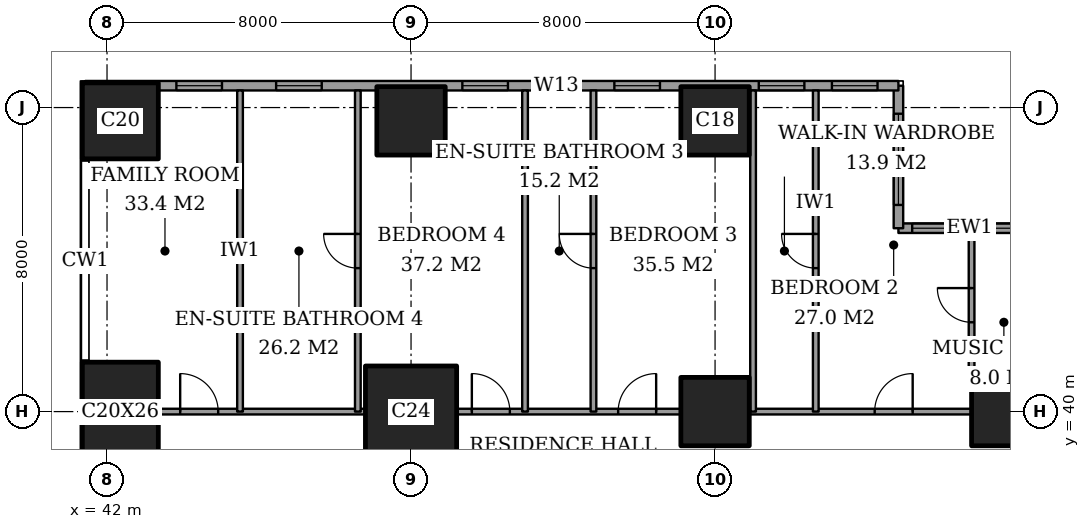
"""IFC4 building model, lengths in metres.
Left out: names, types, materials, properties, quantities, classifications, styles, units other than length and angle.
Written with IfcOpenShell. Run it as: python <this file> out.ifc"""

import sys

from ifc_helpers import new_model, si_unit, direction, frame, frame_2d, origin, origin_2d, place, context, subcontext, project, spatial, rectangle, extrude, element, fill, save


model = new_model("IFC4")
c1 = context("Model", 3, precision=1e-05, world=origin(), true_north=direction((0.0, 1.0)))
c2 = subcontext(c1, "Body", "Model", "MODEL_VIEW")
j1 = project(units=[si_unit("LENGTHUNIT", "METRE"), si_unit("PLANEANGLEUNIT", "RADIAN")], contexts=[c1])
p1 = place(None, origin())
s1 = spatial("IfcSite", under=j1, at=p1, CompositionType="ELEMENT")
p2 = place(p1, origin())
s2 = spatial("IfcBuilding", under=s1, at=p2, CompositionType="ELEMENT")
p3 = place(p2, frame((0.0, 0.0, 211.0)))
s3 = spatial("IfcBuildingStorey", under=s2, at=p3, CompositionType="ELEMENT", Elevation=211.0)
p4 = place(p3, frame((42.35, 40.0, 0.0), z_axis=(0.0, 0.0, 1.0), x_axis=(1.0, 0.0, 0.0)))
e1 = element("IfcColumn", 1, at=p4, inside=s3, PredefinedType="COLUMN", context=c2, shape_type="SweptSolid", body=[
    extrude(rectangle(XDim=2.0, YDim=2.6, at=origin_2d()), origin(), (0.0, 0.0, 1.0), 3.6),
])
p5 = place(p3, frame((42.35, 47.65, 0.0), z_axis=(0.0, 0.0, 1.0), x_axis=(1.0, 0.0, 0.0)))
e2 = element("IfcColumn", 2, at=p5, inside=s3, PredefinedType="COLUMN", context=c2, shape_type="SweptSolid", body=[
    extrude(rectangle(XDim=2.0, YDim=2.0, at=origin_2d()), origin(), (0.0, 0.0, 1.0), 3.6),
])
p6 = place(p3, frame((50.0, 40.0, 0.0), z_axis=(0.0, 0.0, 1.0), x_axis=(1.0, 0.0, 0.0)))
e3 = element("IfcColumn", 3, at=p6, inside=s3, PredefinedType="COLUMN", context=c2, shape_type="SweptSolid", body=[
    extrude(rectangle(XDim=2.4, YDim=2.4, at=origin_2d()), origin(), (0.0, 0.0, 1.0), 3.6),
])
for number, where, z_axis, x_axis in (
    (4, (50.0, 47.65, 0.0), (0.0, 0.0, 1.0), (1.0, 0.0, 0.0)),
    (5, (58.0, 40.0, 0.0), (0.0, 0.0, 1.0), (1.0, 0.0, 0.0)),
    (6, (58.0, 47.65, 0.0), (0.0, 0.0, 1.0), (1.0, 0.0, 0.0)),
    (7, (65.65, 40.0, 0.0), (0.0, 0.0, 1.0), (1.0, 0.0, 0.0)),
):
    element("IfcColumn", number, at=place(p3, frame(where, z_axis=z_axis, x_axis=x_axis)), inside=s3, PredefinedType="COLUMN", context=c2, shape_type="SweptSolid", body=[
        extrude(rectangle(XDim=1.8, YDim=1.8, at=origin_2d()), origin(), (0.0, 0.0, 1.0), 3.6),
    ])
p7 = place(p3, frame((66.575, 44.825, 0.0), z_axis=(0.0, 0.0, 1.0), x_axis=(-1.0, 0.0, 0.0)))
e8 = element("IfcWall", 8, at=p7, inside=s3, PredefinedType="SOLIDWALL", context=c2, shape_type="SweptSolid", body=[
    extrude(rectangle(XDim=3.75, YDim=0.25, at=frame_2d((1.875, 0.0))), origin(), (0.0, 0.0, 1.0), 3.6),
])
p8 = place(p7, frame((0.45, 0.0, 0.2)))
e9 = element("IfcOpeningElement", 9, at=p8, cuts=e8, PredefinedType="OPENING", context=c2, shape_type="SweptSolid", body=[
    extrude(rectangle(XDim=1.2, YDim=2.4, at=frame_2d((0.6, 1.2))), frame((0.0, 0.135, 0.0), z_axis=(0.0, -1.0, 0.0), x_axis=(1.0, 0.0, 0.0)), (0.0, 0.0, 1.0), 0.27),
])
p9 = place(p7, frame((2.188, 0.0, 0.2)))
e10 = element("IfcOpeningElement", 10, at=p9, cuts=e8, PredefinedType="OPENING", context=c2, shape_type="SweptSolid", body=[
    extrude(rectangle(XDim=1.2, YDim=2.4, at=frame_2d((0.6, 1.2))), frame((0.0, 0.135, 0.0), z_axis=(0.0, -1.0, 0.0), x_axis=(1.0, 0.0, 0.0)), (0.0, 0.0, 1.0), 0.27),
])
p10 = place(p3, frame((62.825, 44.825, 0.0), z_axis=(0.0, 0.0, 1.0), x_axis=(0.0, 1.0, 0.0)))
e11 = element("IfcWall", 11, at=p10, inside=s3, PredefinedType="SOLIDWALL", context=c2, shape_type="SweptSolid", body=[
    extrude(rectangle(XDim=3.75, YDim=0.25, at=frame_2d((1.875, 0.0))), origin(), (0.0, 0.0, 1.0), 3.6),
])
p11 = place(p10, frame((0.613, 0.0, 0.2)))
e12 = element("IfcOpeningElement", 12, at=p11, cuts=e11, PredefinedType="OPENING", context=c2, shape_type="SweptSolid", body=[
    extrude(rectangle(XDim=2.4, YDim=2.4, at=frame_2d((1.2, 1.2))), frame((0.0, 0.135, 0.0), z_axis=(0.0, -1.0, 0.0), x_axis=(1.0, 0.0, 0.0)), (0.0, 0.0, 1.0), 0.27),
])
p12 = place(p3, frame((62.825, 48.575, 0.0), z_axis=(0.0, 0.0, 1.0), x_axis=(-1.0, 0.0, 0.0)))
e13 = element("IfcWall", 13, at=p12, inside=s3, PredefinedType="SOLIDWALL", context=c2, shape_type="SweptSolid", body=[
    extrude(rectangle(XDim=21.4, YDim=0.25, at=frame_2d((10.7, 0.0))), origin(), (0.0, 0.0, 1.0), 3.6),
])
p13 = place(p12, frame((0.55, 0.0, 0.2)))
e14 = element("IfcOpeningElement", 14, at=p13, cuts=e13, PredefinedType="OPENING", context=c2, shape_type="SweptSolid", body=[
    extrude(rectangle(XDim=1.2, YDim=2.4, at=frame_2d((0.6, 1.2))), frame((0.0, 0.135, 0.0), z_axis=(0.0, -1.0, 0.0), x_axis=(1.0, 0.0, 0.0)), (0.0, 0.0, 1.0), 0.27),
])
p14 = place(p12, frame((2.475, 0.0, 0.2)))
e15 = element("IfcOpeningElement", 15, at=p14, cuts=e13, PredefinedType="OPENING", context=c2, shape_type="SweptSolid", body=[
    extrude(rectangle(XDim=1.2, YDim=2.4, at=frame_2d((0.6, 1.2))), frame((0.0, 0.135, 0.0), z_axis=(0.0, -1.0, 0.0), x_axis=(1.0, 0.0, 0.0)), (0.0, 0.0, 1.0), 0.27),
])
p15 = place(p12, frame((6.275, 0.0, 0.2)))
e16 = element("IfcOpeningElement", 16, at=p15, cuts=e13, PredefinedType="OPENING", context=c2, shape_type="SweptSolid", body=[
    extrude(rectangle(XDim=1.2, YDim=2.4, at=frame_2d((0.6, 1.2))), frame((0.0, 0.135, 0.0), z_axis=(0.0, -1.0, 0.0), x_axis=(1.0, 0.0, 0.0)), (0.0, 0.0, 1.0), 0.27),
])
p16 = place(p12, frame((8.4, 0.0, 0.2)))
e17 = element("IfcOpeningElement", 17, at=p16, cuts=e13, PredefinedType="OPENING", context=c2, shape_type="SweptSolid", body=[
    extrude(rectangle(XDim=1.2, YDim=2.4, at=frame_2d((0.6, 1.2))), frame((0.0, 0.135, 0.0), z_axis=(0.0, -1.0, 0.0), x_axis=(1.0, 0.0, 0.0)), (0.0, 0.0, 1.0), 0.27),
])
p17 = place(p12, frame((10.275, 0.0, 0.2)))
e18 = element("IfcOpeningElement", 18, at=p17, cuts=e13, PredefinedType="OPENING", context=c2, shape_type="SweptSolid", body=[
    extrude(rectangle(XDim=1.2, YDim=2.4, at=frame_2d((0.6, 1.2))), frame((0.0, 0.135, 0.0), z_axis=(0.0, -1.0, 0.0), x_axis=(1.0, 0.0, 0.0)), (0.0, 0.0, 1.0), 0.27),
])
p18 = place(p12, frame((15.175, 0.0, 0.2)))
e19 = element("IfcOpeningElement", 19, at=p18, cuts=e13, PredefinedType="OPENING", context=c2, shape_type="SweptSolid", body=[
    extrude(rectangle(XDim=1.2, YDim=2.4, at=frame_2d((0.6, 1.2))), frame((0.0, 0.135, 0.0), z_axis=(0.0, -1.0, 0.0), x_axis=(1.0, 0.0, 0.0)), (0.0, 0.0, 1.0), 0.27),
])
p19 = place(p12, frame((17.8, 0.0, 0.2)))
e20 = element("IfcOpeningElement", 20, at=p19, cuts=e13, PredefinedType="OPENING", context=c2, shape_type="SweptSolid", body=[
    extrude(rectangle(XDim=1.2, YDim=2.4, at=frame_2d((0.6, 1.2))), frame((0.0, 0.135, 0.0), z_axis=(0.0, -1.0, 0.0), x_axis=(1.0, 0.0, 0.0)), (0.0, 0.0, 1.0), 0.27),
])
p20 = place(p3, frame((43.35, 40.0, 0.0), z_axis=(0.0, 0.0, 1.0), x_axis=(1.0, 0.0, 0.0)))
e21 = element("IfcWall", 21, at=p20, inside=s3, PredefinedType="PARTITIONING", context=c2, shape_type="SweptSolid", body=[
    extrude(rectangle(XDim=5.45, YDim=0.15, at=frame_2d((2.725, 0.0))), origin(), (0.0, 0.0, 1.0), 3.35),
])
p21 = place(p20, frame((0.575, 0.0, 0.0)))
e22 = element("IfcOpeningElement", 22, at=p21, cuts=e21, PredefinedType="OPENING", context=c2, shape_type="SweptSolid", body=[
    extrude(rectangle(XDim=1.0, YDim=2.1, at=frame_2d((0.5, 1.05))), frame((0.0, 0.085, 0.0), z_axis=(0.0, -1.0, 0.0), x_axis=(1.0, 0.0, 0.0)), (0.0, 0.0, 1.0), 0.17),
])
p22 = place(p3, frame((51.2, 40.0, 0.0), z_axis=(0.0, 0.0, 1.0), x_axis=(1.0, 0.0, 0.0)))
e23 = element("IfcWall", 23, at=p22, inside=s3, PredefinedType="PARTITIONING", context=c2, shape_type="SweptSolid", body=[
    extrude(rectangle(XDim=5.9, YDim=0.15, at=frame_2d((2.95, 0.0))), origin(), (0.0, 0.0, 1.0), 3.35),
])
p23 = place(p22, frame((4.25, 0.0, 0.0)))
e24 = element("IfcOpeningElement", 24, at=p23, cuts=e23, PredefinedType="OPENING", context=c2, shape_type="SweptSolid", body=[
    extrude(rectangle(XDim=1.0, YDim=2.1, at=frame_2d((0.5, 1.05))), frame((0.0, 0.085, 0.0), z_axis=(0.0, -1.0, 0.0), x_axis=(1.0, 0.0, 0.0)), (0.0, 0.0, 1.0), 0.17),
])
p24 = place(p22, frame((0.4, 0.0, 0.0)))
e25 = element("IfcOpeningElement", 25, at=p24, cuts=e23, PredefinedType="OPENING", context=c2, shape_type="SweptSolid", body=[
    extrude(rectangle(XDim=1.0, YDim=2.1, at=frame_2d((0.5, 1.05))), frame((0.0, 0.085, 0.0), z_axis=(0.0, -1.0, 0.0), x_axis=(1.0, 0.0, 0.0)), (0.0, 0.0, 1.0), 0.17),
])
p25 = place(p3, frame((58.9, 40.0, 0.0), z_axis=(0.0, 0.0, 1.0), x_axis=(1.0, 0.0, 0.0)))
e26 = element("IfcWall", 26, at=p25, inside=s3, PredefinedType="PARTITIONING", context=c2, shape_type="SweptSolid", body=[
    extrude(rectangle(XDim=5.85, YDim=0.15, at=frame_2d((2.925, 0.0))), origin(), (0.0, 0.0, 1.0), 3.35),
])
p26 = place(p25, frame((3.3, 0.0, 0.0)))
e27 = element("IfcOpeningElement", 27, at=p26, cuts=e26, PredefinedType="OPENING", context=c2, shape_type="SweptSolid", body=[
    extrude(rectangle(XDim=1.0, YDim=2.1, at=frame_2d((0.5, 1.05))), frame((0.0, 0.085, 0.0), z_axis=(0.0, -1.0, 0.0), x_axis=(1.0, 0.0, 0.0)), (0.0, 0.0, 1.0), 0.17),
])
p27 = place(p3, frame((45.5, 40.0, 0.0), z_axis=(0.0, 0.0, 1.0), x_axis=(0.0, 1.0, 0.0)))
e28 = element("IfcWall", 28, at=p27, inside=s3, PredefinedType="PARTITIONING", context=c2, shape_type="SweptSolid", body=[
    extrude(rectangle(XDim=8.45, YDim=0.15, at=frame_2d((4.225, 0.0))), origin(), (0.0, 0.0, 1.0), 3.35),
])
p28 = place(p3, frame((48.6, 40.0, 0.0), z_axis=(0.0, 0.0, 1.0), x_axis=(0.0, 1.0, 0.0)))
e29 = element("IfcWall", 29, at=p28, inside=s3, PredefinedType="PARTITIONING", context=c2, shape_type="SweptSolid", body=[
    extrude(rectangle(XDim=8.45, YDim=0.15, at=frame_2d((4.225, 0.0))), origin(), (0.0, 0.0, 1.0), 3.35),
])
p29 = place(p28, frame((3.775, 0.0, 0.0)))
e30 = element("IfcOpeningElement", 30, at=p29, cuts=e29, PredefinedType="OPENING", context=c2, shape_type="SweptSolid", body=[
    extrude(rectangle(XDim=0.9, YDim=2.1, at=frame_2d((0.45, 1.05))), frame((0.0, 0.085, 0.0), z_axis=(0.0, -1.0, 0.0), x_axis=(1.0, 0.0, 0.0)), (0.0, 0.0, 1.0), 0.17),
])
p30 = place(p3, frame((53.0, 40.0, 0.0), z_axis=(0.0, 0.0, 1.0), x_axis=(0.0, 1.0, 0.0)))
e31 = element("IfcWall", 31, at=p30, inside=s3, PredefinedType="PARTITIONING", context=c2, shape_type="SweptSolid", body=[
    extrude(rectangle(XDim=8.45, YDim=0.15, at=frame_2d((4.225, 0.0))), origin(), (0.0, 0.0, 1.0), 3.35),
])
p31 = place(p3, frame((54.8, 40.0, 0.0), z_axis=(0.0, 0.0, 1.0), x_axis=(0.0, 1.0, 0.0)))
e32 = element("IfcWall", 32, at=p31, inside=s3, PredefinedType="PARTITIONING", context=c2, shape_type="SweptSolid", body=[
    extrude(rectangle(XDim=8.45, YDim=0.15, at=frame_2d((4.225, 0.0))), origin(), (0.0, 0.0, 1.0), 3.35),
])
p32 = place(p31, frame((3.775, 0.0, 0.0)))
e33 = element("IfcOpeningElement", 33, at=p32, cuts=e32, PredefinedType="OPENING", context=c2, shape_type="SweptSolid", body=[
    extrude(rectangle(XDim=0.9, YDim=2.1, at=frame_2d((0.45, 1.05))), frame((0.0, 0.085, 0.0), z_axis=(0.0, -1.0, 0.0), x_axis=(1.0, 0.0, 0.0)), (0.0, 0.0, 1.0), 0.17),
])
p33 = place(p3, frame((59.0, 40.0, 0.0), z_axis=(0.0, 0.0, 1.0), x_axis=(0.0, 1.0, 0.0)))
e34 = element("IfcWall", 34, at=p33, inside=s3, PredefinedType="PARTITIONING", context=c2, shape_type="SweptSolid", body=[
    extrude(rectangle(XDim=8.45, YDim=0.15, at=frame_2d((4.225, 0.0))), origin(), (0.0, 0.0, 1.0), 3.35),
])
p34 = place(p3, frame((60.65, 40.0, 0.0), z_axis=(0.0, 0.0, 1.0), x_axis=(0.0, 1.0, 0.0)))
e35 = element("IfcWall", 35, at=p34, inside=s3, PredefinedType="PARTITIONING", context=c2, shape_type="SweptSolid", body=[
    extrude(rectangle(XDim=8.45, YDim=0.15, at=frame_2d((4.225, 0.0))), origin(), (0.0, 0.0, 1.0), 3.35),
])
p35 = place(p34, frame((3.775, 0.0, 0.0)))
e36 = element("IfcOpeningElement", 36, at=p35, cuts=e35, PredefinedType="OPENING", context=c2, shape_type="SweptSolid", body=[
    extrude(rectangle(XDim=0.9, YDim=2.1, at=frame_2d((0.45, 1.05))), frame((0.0, 0.085, 0.0), z_axis=(0.0, -1.0, 0.0), x_axis=(1.0, 0.0, 0.0)), (0.0, 0.0, 1.0), 0.17),
])
p36 = place(p3, frame((64.75, 40.9, 0.0), z_axis=(0.0, 0.0, 1.0), x_axis=(0.0, 1.0, 0.0)))
e37 = element("IfcWall", 37, at=p36, inside=s3, PredefinedType="PARTITIONING", context=c2, shape_type="SweptSolid", body=[
    extrude(rectangle(XDim=3.8, YDim=0.15, at=frame_2d((1.9, 0.0))), origin(), (0.0, 0.0, 1.0), 3.35),
])
p37 = place(p36, frame((1.45, 0.0, 0.0)))
e38 = element("IfcOpeningElement", 38, at=p37, cuts=e37, PredefinedType="OPENING", context=c2, shape_type="SweptSolid", body=[
    extrude(rectangle(XDim=0.9, YDim=2.1, at=frame_2d((0.45, 1.05))), frame((0.0, 0.085, 0.0), z_axis=(0.0, -1.0, 0.0), x_axis=(1.0, 0.0, 0.0)), (0.0, 0.0, 1.0), 0.17),
])
p38 = place(p8, origin())
e39 = element("IfcWindow", 39, at=p38, inside=s3, PartitioningType="SINGLE_PANEL", PredefinedType="WINDOW", context=c2, shape_type="SweptSolid", body=[
    extrude(rectangle(XDim=1.2, YDim=2.4, at=frame_2d((0.6, 1.2))), frame((0.0, 0.03, 0.0), z_axis=(0.0, -1.0, 0.0), x_axis=(1.0, 0.0, 0.0)), (0.0, 0.0, 1.0), 0.06),
])
fill(e9, e39)
p39 = place(p9, origin())
e40 = element("IfcWindow", 40, at=p39, inside=s3, PartitioningType="SINGLE_PANEL", PredefinedType="WINDOW", context=c2, shape_type="SweptSolid", body=[
    extrude(rectangle(XDim=1.2, YDim=2.4, at=frame_2d((0.6, 1.2))), frame((0.0, 0.03, 0.0), z_axis=(0.0, -1.0, 0.0), x_axis=(1.0, 0.0, 0.0)), (0.0, 0.0, 1.0), 0.06),
])
fill(e10, e40)
p40 = place(p11, origin())
e41 = element("IfcWindow", 41, at=p40, inside=s3, PartitioningType="SINGLE_PANEL", PredefinedType="WINDOW", context=c2, shape_type="SweptSolid", body=[
    extrude(rectangle(XDim=2.4, YDim=2.4, at=frame_2d((1.2, 1.2))), frame((0.0, 0.03, 0.0), z_axis=(0.0, -1.0, 0.0), x_axis=(1.0, 0.0, 0.0)), (0.0, 0.0, 1.0), 0.06),
])
fill(e12, e41)
p41 = place(p13, origin())
e42 = element("IfcWindow", 42, at=p41, inside=s3, PartitioningType="SINGLE_PANEL", PredefinedType="WINDOW", context=c2, shape_type="SweptSolid", body=[
    extrude(rectangle(XDim=1.2, YDim=2.4, at=frame_2d((0.6, 1.2))), frame((0.0, 0.03, 0.0), z_axis=(0.0, -1.0, 0.0), x_axis=(1.0, 0.0, 0.0)), (0.0, 0.0, 1.0), 0.06),
])
fill(e14, e42)
p42 = place(p14, origin())
e43 = element("IfcWindow", 43, at=p42, inside=s3, PartitioningType="SINGLE_PANEL", PredefinedType="WINDOW", context=c2, shape_type="SweptSolid", body=[
    extrude(rectangle(XDim=1.2, YDim=2.4, at=frame_2d((0.6, 1.2))), frame((0.0, 0.03, 0.0), z_axis=(0.0, -1.0, 0.0), x_axis=(1.0, 0.0, 0.0)), (0.0, 0.0, 1.0), 0.06),
])
fill(e15, e43)
p43 = place(p15, origin())
e44 = element("IfcWindow", 44, at=p43, inside=s3, PartitioningType="SINGLE_PANEL", PredefinedType="WINDOW", context=c2, shape_type="SweptSolid", body=[
    extrude(rectangle(XDim=1.2, YDim=2.4, at=frame_2d((0.6, 1.2))), frame((0.0, 0.03, 0.0), z_axis=(0.0, -1.0, 0.0), x_axis=(1.0, 0.0, 0.0)), (0.0, 0.0, 1.0), 0.06),
])
fill(e16, e44)
p44 = place(p16, origin())
e45 = element("IfcWindow", 45, at=p44, inside=s3, PartitioningType="SINGLE_PANEL", PredefinedType="WINDOW", context=c2, shape_type="SweptSolid", body=[
    extrude(rectangle(XDim=1.2, YDim=2.4, at=frame_2d((0.6, 1.2))), frame((0.0, 0.03, 0.0), z_axis=(0.0, -1.0, 0.0), x_axis=(1.0, 0.0, 0.0)), (0.0, 0.0, 1.0), 0.06),
])
fill(e17, e45)
p45 = place(p17, origin())
e46 = element("IfcWindow", 46, at=p45, inside=s3, PartitioningType="SINGLE_PANEL", PredefinedType="WINDOW", context=c2, shape_type="SweptSolid", body=[
    extrude(rectangle(XDim=1.2, YDim=2.4, at=frame_2d((0.6, 1.2))), frame((0.0, 0.03, 0.0), z_axis=(0.0, -1.0, 0.0), x_axis=(1.0, 0.0, 0.0)), (0.0, 0.0, 1.0), 0.06),
])
fill(e18, e46)
p46 = place(p18, origin())
e47 = element("IfcWindow", 47, at=p46, inside=s3, PartitioningType="SINGLE_PANEL", PredefinedType="WINDOW", context=c2, shape_type="SweptSolid", body=[
    extrude(rectangle(XDim=1.2, YDim=2.4, at=frame_2d((0.6, 1.2))), frame((0.0, 0.03, 0.0), z_axis=(0.0, -1.0, 0.0), x_axis=(1.0, 0.0, 0.0)), (0.0, 0.0, 1.0), 0.06),
])
fill(e19, e47)
p47 = place(p19, origin())
e48 = element("IfcWindow", 48, at=p47, inside=s3, PartitioningType="SINGLE_PANEL", PredefinedType="WINDOW", context=c2, shape_type="SweptSolid", body=[
    extrude(rectangle(XDim=1.2, YDim=2.4, at=frame_2d((0.6, 1.2))), frame((0.0, 0.03, 0.0), z_axis=(0.0, -1.0, 0.0), x_axis=(1.0, 0.0, 0.0)), (0.0, 0.0, 1.0), 0.06),
])
fill(e20, e48)
p48 = place(p37, origin())
e49 = element("IfcDoor", 49, at=p48, inside=s3, OperationType="SINGLE_SWING_LEFT", PredefinedType="DOOR", context=c2, shape_type="SweptSolid", body=[
    extrude(rectangle(XDim=0.9, YDim=2.1, at=frame_2d((0.45, 1.05))), frame((0.0, 0.025, 0.0), z_axis=(0.0, -1.0, 0.0), x_axis=(1.0, 0.0, 0.0)), (0.0, 0.0, 1.0), 0.05),
])
fill(e38, e49)
p49 = place(p26, origin())
e50 = element("IfcDoor", 50, at=p49, inside=s3, OperationType="SINGLE_SWING_LEFT", PredefinedType="DOOR", context=c2, shape_type="SweptSolid", body=[
    extrude(rectangle(XDim=1.0, YDim=2.1, at=frame_2d((0.5, 1.05))), frame((0.0, 0.025, 0.0), z_axis=(0.0, -1.0, 0.0), x_axis=(1.0, 0.0, 0.0)), (0.0, 0.0, 1.0), 0.05),
])
fill(e27, e50)
p50 = place(p35, origin())
e51 = element("IfcDoor", 51, at=p50, inside=s3, OperationType="SINGLE_SWING_LEFT", PredefinedType="DOOR", context=c2, shape_type="SweptSolid", body=[
    extrude(rectangle(XDim=0.9, YDim=2.1, at=frame_2d((0.45, 1.05))), frame((0.0, 0.025, 0.0), z_axis=(0.0, -1.0, 0.0), x_axis=(1.0, 0.0, 0.0)), (0.0, 0.0, 1.0), 0.05),
])
fill(e36, e51)
p51 = place(p23, origin())
e52 = element("IfcDoor", 52, at=p51, inside=s3, OperationType="SINGLE_SWING_LEFT", PredefinedType="DOOR", context=c2, shape_type="SweptSolid", body=[
    extrude(rectangle(XDim=1.0, YDim=2.1, at=frame_2d((0.5, 1.05))), frame((0.0, 0.025, 0.0), z_axis=(0.0, -1.0, 0.0), x_axis=(1.0, 0.0, 0.0)), (0.0, 0.0, 1.0), 0.05),
])
fill(e24, e52)
p52 = place(p32, origin())
e53 = element("IfcDoor", 53, at=p52, inside=s3, OperationType="SINGLE_SWING_LEFT", PredefinedType="DOOR", context=c2, shape_type="SweptSolid", body=[
    extrude(rectangle(XDim=0.9, YDim=2.1, at=frame_2d((0.45, 1.05))), frame((0.0, 0.025, 0.0), z_axis=(0.0, -1.0, 0.0), x_axis=(1.0, 0.0, 0.0)), (0.0, 0.0, 1.0), 0.05),
])
fill(e33, e53)
p53 = place(p24, origin())
e54 = element("IfcDoor", 54, at=p53, inside=s3, OperationType="SINGLE_SWING_RIGHT", PredefinedType="DOOR", context=c2, shape_type="SweptSolid", body=[
    extrude(rectangle(XDim=1.0, YDim=2.1, at=frame_2d((0.5, 1.05))), frame((0.0, 0.025, 0.0), z_axis=(0.0, -1.0, 0.0), x_axis=(1.0, 0.0, 0.0)), (0.0, 0.0, 1.0), 0.05),
])
fill(e25, e54)
p54 = place(p29, origin())
e55 = element("IfcDoor", 55, at=p54, inside=s3, OperationType="SINGLE_SWING_LEFT", PredefinedType="DOOR", context=c2, shape_type="SweptSolid", body=[
    extrude(rectangle(XDim=0.9, YDim=2.1, at=frame_2d((0.45, 1.05))), frame((0.0, 0.025, 0.0), z_axis=(0.0, -1.0, 0.0), x_axis=(1.0, 0.0, 0.0)), (0.0, 0.0, 1.0), 0.05),
])
fill(e30, e55)
p55 = place(p21, origin())
e56 = element("IfcDoor", 56, at=p55, inside=s3, OperationType="SINGLE_SWING_RIGHT", PredefinedType="DOOR", context=c2, shape_type="SweptSolid", body=[
    extrude(rectangle(XDim=1.0, YDim=2.1, at=frame_2d((0.5, 1.05))), frame((0.0, 0.025, 0.0), z_axis=(0.0, -1.0, 0.0), x_axis=(1.0, 0.0, 0.0)), (0.0, 0.0, 1.0), 0.05),
])
fill(e22, e56)
save(model, sys.argv[1])
